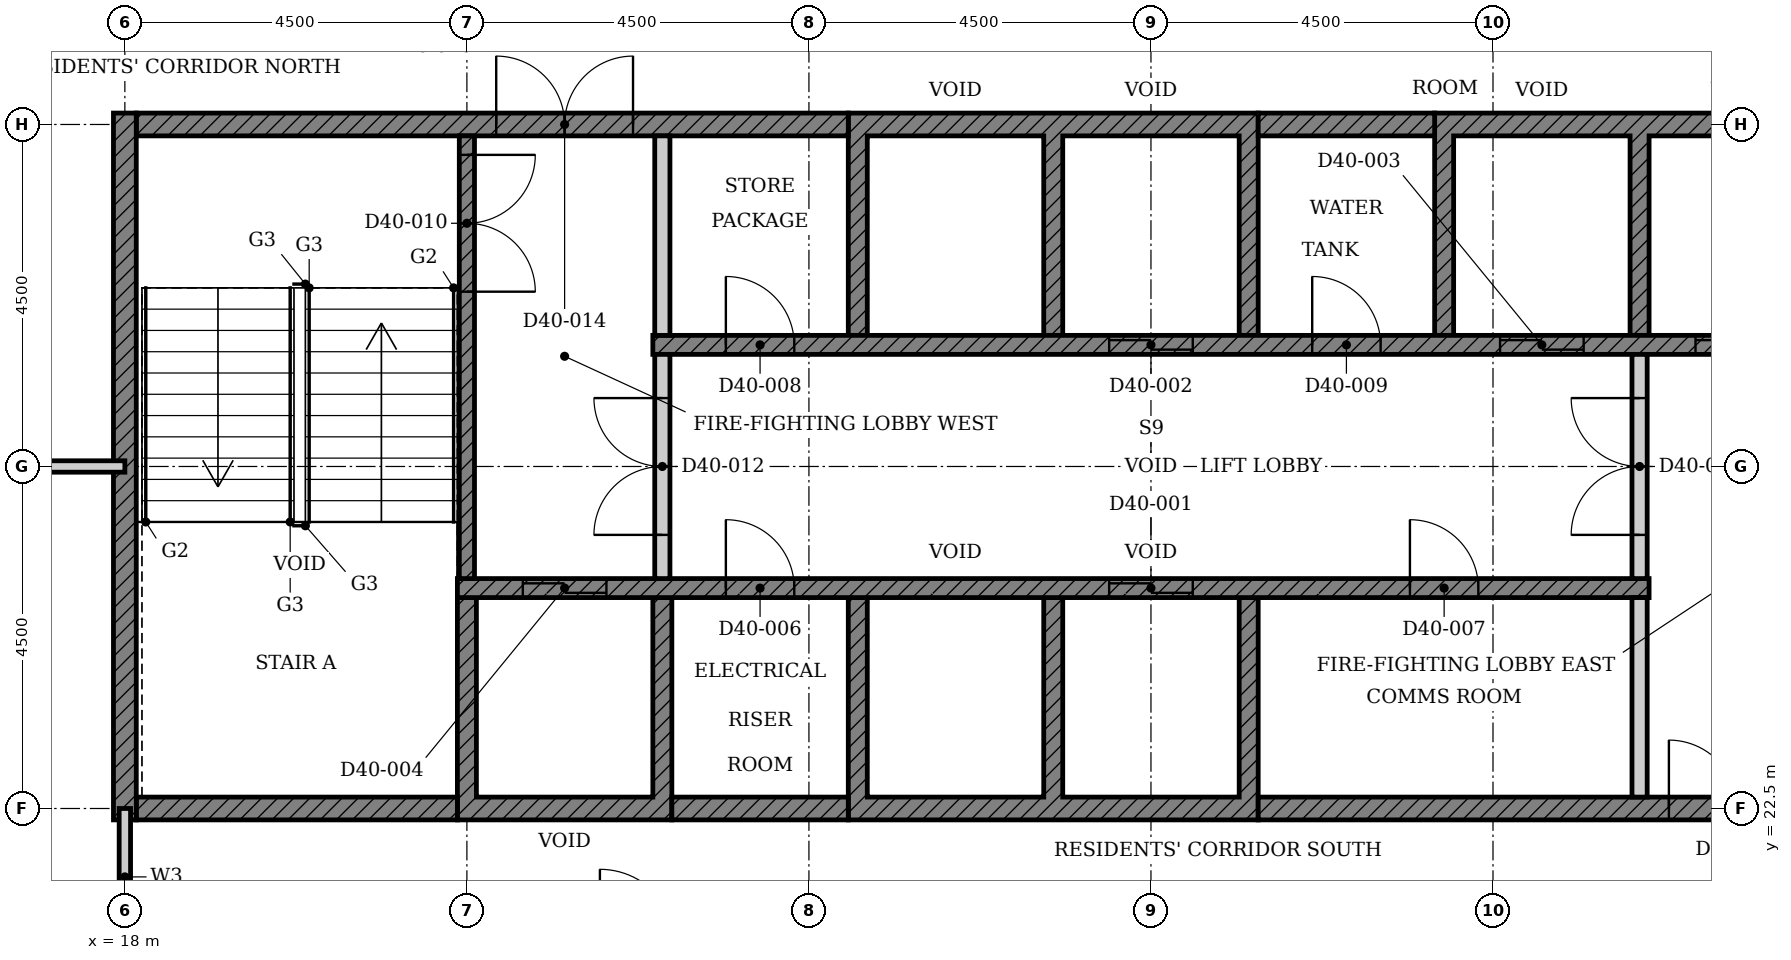
"""IFC4 building model, lengths in metres.
Left out: names, types, materials, properties, quantities, classifications, styles, units other than length and angle.
Written with IfcOpenShell. Run it as: python <this file> out.ifc"""

import sys

from ifc_helpers import new_model, si_unit, direction, frame, frame_2d, origin, place, context, subcontext, project, spatial, polyline, rectangle, outline, extrude, element, fill, save


model = new_model("IFC4")
c1 = context("Model", 3, precision=1e-05, world=origin(), true_north=direction((0.0, 1.0)))
c2 = subcontext(c1, "Body", "Model", "MODEL_VIEW")
j1 = project(units=[si_unit("LENGTHUNIT", "METRE"), si_unit("PLANEANGLEUNIT", "RADIAN")], contexts=[c1])
p1 = place(None, origin())
s1 = spatial("IfcSite", under=j1, at=p1, CompositionType="ELEMENT")
p2 = place(p1, origin())
s2 = spatial("IfcBuilding", under=s1, at=p2, CompositionType="ELEMENT")
p3 = place(p2, frame((0.0, 0.0, 161.7)))
s3 = spatial("IfcBuildingStorey", under=s2, at=p3, CompositionType="ELEMENT", Elevation=161.7)
p4 = place(p3, origin())
e1 = element("IfcWall", 1, at=p4, inside=s3, PredefinedType="SHEAR", context=c2, shape_type="SweptSolid", body=[
    extrude(outline(polyline([(22.375, 22.35), (25.197, 22.35), (25.197, 25.275), (24.947, 25.275), (24.947, 22.65), (22.625, 22.65), (22.625, 25.275), (22.375, 25.275), (22.375, 22.35)])), origin(), (0.0, 0.0, 1.0), 3.4),
])
p5 = place(p3, origin())
e2 = element("IfcWall", 2, at=p5, inside=s3, PredefinedType="SHEAR", context=c2, shape_type="SweptSolid", body=[
    extrude(outline(polyline([(27.518, 22.35), (32.911, 22.35), (32.911, 25.275), (32.661, 25.275), (32.661, 22.65), (30.339, 22.65), (30.339, 25.275), (30.089, 25.275), (30.089, 22.65), (27.768, 22.65), (27.768, 25.275), (27.518, 25.275), (27.518, 22.35)])), origin(), (0.0, 0.0, 1.0), 3.4),
])
p6 = place(p3, origin())
e3 = element("IfcWall", 3, at=p6, inside=s3, PredefinedType="SHEAR", context=c2, shape_type="SweptSolid", body=[
    extrude(outline(polyline([(27.518, 28.725), (27.768, 28.725), (27.768, 31.35), (30.089, 31.35), (30.089, 28.725), (30.339, 28.725), (30.339, 31.35), (32.661, 31.35), (32.661, 28.725), (32.911, 28.725), (32.911, 31.65), (27.518, 31.65), (27.518, 28.725)])), origin(), (0.0, 0.0, 1.0), 3.4),
])
p7 = place(p3, origin())
e4 = element("IfcWall", 4, at=p7, inside=s3, PredefinedType="SHEAR", context=c2, shape_type="SweptSolid", body=[
    extrude(outline(polyline([(35.232, 28.725), (35.482, 28.725), (35.482, 31.35), (37.803, 31.35), (37.803, 28.725), (38.053, 28.725), (38.053, 31.35), (40.375, 31.35), (40.375, 28.725), (40.625, 28.725), (40.625, 31.65), (35.232, 31.65), (35.232, 28.725)])), origin(), (0.0, 0.0, 1.0), 3.4),
])
p8 = place(p3, frame((18.15, 22.5, 0.0), z_axis=(0.0, 0.0, 1.0), x_axis=(1.0, 0.0, 0.0)))
e5 = element("IfcWall", 5, at=p8, inside=s3, PredefinedType="SHEAR", context=c2, shape_type="SweptSolid", body=[
    extrude(rectangle(XDim=4.225, YDim=0.3, at=frame_2d((2.113, 0.0))), origin(), (0.0, 0.0, 1.0), 3.4),
])
p9 = place(p3, frame((25.197, 22.5, 0.0), z_axis=(0.0, 0.0, 1.0), x_axis=(1.0, 0.0, 0.0)))
e6 = element("IfcWall", 6, at=p9, inside=s3, PredefinedType="SHEAR", context=c2, shape_type="SweptSolid", body=[
    extrude(rectangle(XDim=2.321, YDim=0.3, at=frame_2d((1.161, 0.0))), origin(), (0.0, 0.0, 1.0), 3.4),
])
p10 = place(p3, frame((32.911, 22.5, 0.0), z_axis=(0.0, 0.0, 1.0), x_axis=(1.0, 0.0, 0.0)))
e7 = element("IfcWall", 7, at=p10, inside=s3, PredefinedType="SHEAR", context=c2, shape_type="SweptSolid", body=[
    extrude(rectangle(XDim=11.939, YDim=0.3, at=frame_2d((5.97, 0.0))), origin(), (0.0, 0.0, 1.0), 3.4),
])
p11 = place(p10, frame((5.404, 0.0, 0.0)))
e8 = element("IfcOpeningElement", 8, at=p11, cuts=e7, PredefinedType="OPENING", context=c2, shape_type="SweptSolid", body=[
    extrude(rectangle(XDim=1.8, YDim=2.1, at=frame_2d((0.9, 1.05))), frame((0.0, 0.16, 0.0), z_axis=(0.0, -1.0, 0.0), x_axis=(1.0, 0.0, 0.0)), (0.0, 0.0, 1.0), 0.32),
])
p12 = place(p3, frame((18.15, 31.5, 0.0), z_axis=(0.0, 0.0, 1.0), x_axis=(1.0, 0.0, 0.0)))
e9 = element("IfcWall", 9, at=p12, inside=s3, PredefinedType="SHEAR", context=c2, shape_type="SweptSolid", body=[
    extrude(rectangle(XDim=9.368, YDim=0.3, at=frame_2d((4.684, 0.0))), origin(), (0.0, 0.0, 1.0), 3.4),
])
p13 = place(p12, frame((4.736, 0.0, 0.0)))
e10 = element("IfcOpeningElement", 10, at=p13, cuts=e9, PredefinedType="OPENING", context=c2, shape_type="SweptSolid", body=[
    extrude(rectangle(XDim=1.8, YDim=2.1, at=frame_2d((0.9, 1.05))), frame((0.0, 0.16, 0.0), z_axis=(0.0, -1.0, 0.0), x_axis=(1.0, 0.0, 0.0)), (0.0, 0.0, 1.0), 0.32),
])
p14 = place(p3, frame((32.911, 31.5, 0.0), z_axis=(0.0, 0.0, 1.0), x_axis=(1.0, 0.0, 0.0)))
e11 = element("IfcWall", 11, at=p14, inside=s3, PredefinedType="SHEAR", context=c2, shape_type="SweptSolid", body=[
    extrude(rectangle(XDim=2.322, YDim=0.3, at=frame_2d((1.161, 0.0))), origin(), (0.0, 0.0, 1.0), 3.4),
])
p15 = place(p3, frame((18.0, 22.35, 0.0), z_axis=(0.0, 0.0, 1.0), x_axis=(0.0, 1.0, 0.0)))
e12 = element("IfcWall", 12, at=p15, inside=s3, PredefinedType="SHEAR", context=c2, shape_type="SweptSolid", body=[
    extrude(rectangle(XDim=9.3, YDim=0.3, at=frame_2d((4.65, 0.0))), origin(), (0.0, 0.0, 1.0), 3.4),
])
p16 = place(p3, frame((22.375, 25.4, 0.0), z_axis=(0.0, 0.0, 1.0), x_axis=(1.0, 0.0, 0.0)))
e13 = element("IfcWall", 13, at=p16, inside=s3, PredefinedType="SHEAR", context=c2, shape_type="SweptSolid", body=[
    extrude(rectangle(XDim=15.678, YDim=0.25, at=frame_2d((7.839, 0.0))), origin(), (0.0, 0.0, 1.0), 3.4),
])
p17 = place(p16, frame((8.575, 0.0, 0.0)))
e14 = element("IfcOpeningElement", 14, at=p17, cuts=e13, PredefinedType="OPENING", context=c2, shape_type="SweptSolid", body=[
    extrude(rectangle(XDim=1.1, YDim=2.1, at=frame_2d((0.55, 1.05))), frame((0.0, 0.135, 0.0), z_axis=(0.0, -1.0, 0.0), x_axis=(1.0, 0.0, 0.0)), (0.0, 0.0, 1.0), 0.27),
])
p18 = place(p16, frame((0.861, 0.0, 0.0)))
e15 = element("IfcOpeningElement", 15, at=p18, cuts=e13, PredefinedType="OPENING", context=c2, shape_type="SweptSolid", body=[
    extrude(rectangle(XDim=1.1, YDim=2.1, at=frame_2d((0.55, 1.05))), frame((0.0, 0.135, 0.0), z_axis=(0.0, -1.0, 0.0), x_axis=(1.0, 0.0, 0.0)), (0.0, 0.0, 1.0), 0.27),
])
p19 = place(p16, frame((3.532, 0.0, 0.0)))
e16 = element("IfcOpeningElement", 16, at=p19, cuts=e13, PredefinedType="OPENING", context=c2, shape_type="SweptSolid", body=[
    extrude(rectangle(XDim=0.9, YDim=2.1, at=frame_2d((0.45, 1.05))), frame((0.0, 0.135, 0.0), z_axis=(0.0, -1.0, 0.0), x_axis=(1.0, 0.0, 0.0)), (0.0, 0.0, 1.0), 0.27),
])
p20 = place(p16, frame((12.532, 0.0, 0.0)))
e17 = element("IfcOpeningElement", 17, at=p20, cuts=e13, PredefinedType="OPENING", context=c2, shape_type="SweptSolid", body=[
    extrude(rectangle(XDim=0.9, YDim=2.1, at=frame_2d((0.45, 1.05))), frame((0.0, 0.135, 0.0), z_axis=(0.0, -1.0, 0.0), x_axis=(1.0, 0.0, 0.0)), (0.0, 0.0, 1.0), 0.27),
])
p21 = place(p3, frame((24.947, 28.6, 0.0), z_axis=(0.0, 0.0, 1.0), x_axis=(1.0, 0.0, 0.0)))
e18 = element("IfcWall", 18, at=p21, inside=s3, PredefinedType="SHEAR", context=c2, shape_type="SweptSolid", body=[
    extrude(rectangle(XDim=15.678, YDim=0.25, at=frame_2d((7.839, 0.0))), origin(), (0.0, 0.0, 1.0), 3.4),
])
p22 = place(p21, frame((6.004, 0.0, 0.0)))
e19 = element("IfcOpeningElement", 19, at=p22, cuts=e18, PredefinedType="OPENING", context=c2, shape_type="SweptSolid", body=[
    extrude(rectangle(XDim=1.1, YDim=2.1, at=frame_2d((0.55, 1.05))), frame((0.0, 0.135, 0.0), z_axis=(0.0, -1.0, 0.0), x_axis=(1.0, 0.0, 0.0)), (0.0, 0.0, 1.0), 0.27),
])
p23 = place(p21, frame((11.146, 0.0, 0.0)))
e20 = element("IfcOpeningElement", 20, at=p23, cuts=e18, PredefinedType="OPENING", context=c2, shape_type="SweptSolid", body=[
    extrude(rectangle(XDim=1.1, YDim=2.1, at=frame_2d((0.55, 1.05))), frame((0.0, 0.135, 0.0), z_axis=(0.0, -1.0, 0.0), x_axis=(1.0, 0.0, 0.0)), (0.0, 0.0, 1.0), 0.27),
])
p24 = place(p21, frame((13.718, 0.0, 0.0)))
e21 = element("IfcOpeningElement", 21, at=p24, cuts=e18, PredefinedType="OPENING", context=c2, shape_type="SweptSolid", body=[
    extrude(rectangle(XDim=1.1, YDim=2.1, at=frame_2d((0.55, 1.05))), frame((0.0, 0.135, 0.0), z_axis=(0.0, -1.0, 0.0), x_axis=(1.0, 0.0, 0.0)), (0.0, 0.0, 1.0), 0.27),
])
p25 = place(p21, frame((0.961, 0.0, 0.0)))
e22 = element("IfcOpeningElement", 22, at=p25, cuts=e18, PredefinedType="OPENING", context=c2, shape_type="SweptSolid", body=[
    extrude(rectangle(XDim=0.9, YDim=2.1, at=frame_2d((0.45, 1.05))), frame((0.0, 0.135, 0.0), z_axis=(0.0, -1.0, 0.0), x_axis=(1.0, 0.0, 0.0)), (0.0, 0.0, 1.0), 0.27),
])
p26 = place(p21, frame((8.675, 0.0, 0.0)))
e23 = element("IfcOpeningElement", 23, at=p26, cuts=e18, PredefinedType="OPENING", context=c2, shape_type="SweptSolid", body=[
    extrude(rectangle(XDim=0.9, YDim=2.1, at=frame_2d((0.45, 1.05))), frame((0.0, 0.135, 0.0), z_axis=(0.0, -1.0, 0.0), x_axis=(1.0, 0.0, 0.0)), (0.0, 0.0, 1.0), 0.27),
])
for number, where, z_axis, x_axis in (
    (24, (37.928, 22.65, 0.0), (0.0, 0.0, 1.0), (0.0, 1.0, 0.0)),
    (25, (25.072, 28.725, 0.0), (0.0, 0.0, 1.0), (0.0, 1.0, 0.0)),
):
    element("IfcWall", number, at=place(p3, frame(where, z_axis=z_axis, x_axis=x_axis)), inside=s3, PredefinedType="PARTITIONING", context=c2, shape_type="SweptSolid", body=[
        extrude(rectangle(XDim=2.625, YDim=0.2, at=frame_2d((1.312, 0.0))), origin(), (0.0, 0.0, 1.0), 3.4),
    ])
p27 = place(p3, frame((22.5, 31.35, 0.0), z_axis=(0.0, 0.0, 1.0), x_axis=(0.0, -1.0, 0.0)))
e26 = element("IfcWall", 26, at=p27, inside=s3, PredefinedType="SHEAR", context=c2, shape_type="SweptSolid", body=[
    extrude(rectangle(XDim=5.825, YDim=0.2, at=frame_2d((2.913, 0.0))), origin(), (0.0, 0.0, 1.0), 3.4),
])
p28 = place(p27, frame((0.25, 0.0, 0.0)))
e27 = element("IfcOpeningElement", 27, at=p28, cuts=e26, PredefinedType="OPENING", context=c2, shape_type="SweptSolid", body=[
    extrude(rectangle(XDim=1.8, YDim=2.1, at=frame_2d((0.9, 1.05))), frame((0.0, 0.11, 0.0), z_axis=(0.0, -1.0, 0.0), x_axis=(1.0, 0.0, 0.0)), (0.0, 0.0, 1.0), 0.22),
])
p29 = place(p3, frame((25.072, 25.525, 0.0), z_axis=(0.0, 0.0, 1.0), x_axis=(0.0, 1.0, 0.0)))
e28 = element("IfcWall", 28, at=p29, inside=s3, PredefinedType="PARTITIONING", context=c2, shape_type="SweptSolid", body=[
    extrude(rectangle(XDim=2.95, YDim=0.2, at=frame_2d((1.475, 0.0))), origin(), (0.0, 0.0, 1.0), 3.4),
])
p30 = place(p29, frame((0.575, 0.0, 0.0)))
e29 = element("IfcOpeningElement", 29, at=p30, cuts=e28, PredefinedType="OPENING", context=c2, shape_type="SweptSolid", body=[
    extrude(rectangle(XDim=1.8, YDim=2.1, at=frame_2d((0.9, 1.05))), frame((0.0, 0.11, 0.0), z_axis=(0.0, -1.0, 0.0), x_axis=(1.0, 0.0, 0.0)), (0.0, 0.0, 1.0), 0.22),
])
p31 = place(p3, frame((37.928, 25.525, 0.0), z_axis=(0.0, 0.0, 1.0), x_axis=(0.0, 1.0, 0.0)))
e30 = element("IfcWall", 30, at=p31, inside=s3, PredefinedType="PARTITIONING", context=c2, shape_type="SweptSolid", body=[
    extrude(rectangle(XDim=2.95, YDim=0.2, at=frame_2d((1.475, 0.0))), origin(), (0.0, 0.0, 1.0), 3.4),
])
p32 = place(p31, frame((0.575, 0.0, 0.0)))
e31 = element("IfcOpeningElement", 31, at=p32, cuts=e30, PredefinedType="OPENING", context=c2, shape_type="SweptSolid", body=[
    extrude(rectangle(XDim=1.8, YDim=2.1, at=frame_2d((0.9, 1.05))), frame((0.0, 0.11, 0.0), z_axis=(0.0, -1.0, 0.0), x_axis=(1.0, 0.0, 0.0)), (0.0, 0.0, 1.0), 0.22),
])
p33 = place(p3, frame((4.5, 27.0, 0.0), z_axis=(0.0, 0.0, 1.0), x_axis=(1.0, 0.0, 0.0)))
e32 = element("IfcWall", 32, at=p33, inside=s3, PredefinedType="PARTITIONING", context=c2, shape_type="SweptSolid", body=[
    extrude(rectangle(XDim=13.5, YDim=0.15, at=frame_2d((6.75, 0.0))), origin(), (0.0, 0.0, 1.0), 2.68),
])
p34 = place(p33, frame((5.35, 0.0, 0.0)))
e33 = element("IfcOpeningElement", 33, at=p34, cuts=e32, PredefinedType="OPENING", context=c2, shape_type="SweptSolid", body=[
    extrude(rectangle(XDim=1.0, YDim=2.1, at=frame_2d((0.5, 1.05))), frame((0.0, 0.085, 0.0), z_axis=(0.0, -1.0, 0.0), x_axis=(1.0, 0.0, 0.0)), (0.0, 0.0, 1.0), 0.17),
])
p35 = place(p3, frame((18.0, 20.7, 0.0), z_axis=(0.0, 0.0, 1.0), x_axis=(0.0, 1.0, 0.0)))
e34 = element("IfcWall", 34, at=p35, inside=s3, PredefinedType="PARTITIONING", context=c2, shape_type="SweptSolid", body=[
    extrude(rectangle(XDim=1.8, YDim=0.15, at=frame_2d((0.9, 0.0))), origin(), (0.0, 0.0, 1.0), 3.4),
])
p36 = place(p17, origin())
e35 = element("IfcDoor", 35, at=p36, inside=s3, OperationType="DOUBLE_DOOR_SLIDING", PredefinedType="DOOR", context=c2, shape_type="SweptSolid", body=[
    extrude(rectangle(XDim=1.1, YDim=2.1, at=frame_2d((0.55, 1.05))), frame((0.0, 0.025, 0.0), z_axis=(0.0, -1.0, 0.0), x_axis=(1.0, 0.0, 0.0)), (0.0, 0.0, 1.0), 0.05),
])
fill(e14, e35)
p37 = place(p22, origin())
e36 = element("IfcDoor", 36, at=p37, inside=s3, OperationType="DOUBLE_DOOR_SLIDING", PredefinedType="DOOR", context=c2, shape_type="SweptSolid", body=[
    extrude(rectangle(XDim=1.1, YDim=2.1, at=frame_2d((0.55, 1.05))), frame((0.0, 0.025, 0.0), z_axis=(0.0, -1.0, 0.0), x_axis=(1.0, 0.0, 0.0)), (0.0, 0.0, 1.0), 0.05),
])
fill(e19, e36)
p38 = place(p23, origin())
e37 = element("IfcDoor", 37, at=p38, inside=s3, OperationType="DOUBLE_DOOR_SLIDING", PredefinedType="DOOR", context=c2, shape_type="SweptSolid", body=[
    extrude(rectangle(XDim=1.1, YDim=2.1, at=frame_2d((0.55, 1.05))), frame((0.0, 0.025, 0.0), z_axis=(0.0, -1.0, 0.0), x_axis=(1.0, 0.0, 0.0)), (0.0, 0.0, 1.0), 0.05),
])
fill(e20, e37)
p39 = place(p18, origin())
e38 = element("IfcDoor", 38, at=p39, inside=s3, OperationType="DOUBLE_DOOR_SLIDING", PredefinedType="DOOR", context=c2, shape_type="SweptSolid", body=[
    extrude(rectangle(XDim=1.1, YDim=2.1, at=frame_2d((0.55, 1.05))), frame((0.0, 0.025, 0.0), z_axis=(0.0, -1.0, 0.0), x_axis=(1.0, 0.0, 0.0)), (0.0, 0.0, 1.0), 0.05),
])
fill(e15, e38)
p40 = place(p24, origin())
e39 = element("IfcDoor", 39, at=p40, inside=s3, OperationType="DOUBLE_DOOR_SLIDING", PredefinedType="DOOR", context=c2, shape_type="SweptSolid", body=[
    extrude(rectangle(XDim=1.1, YDim=2.1, at=frame_2d((0.55, 1.05))), frame((0.0, 0.025, 0.0), z_axis=(0.0, -1.0, 0.0), x_axis=(1.0, 0.0, 0.0)), (0.0, 0.0, 1.0), 0.05),
])
fill(e21, e39)
p41 = place(p19, origin())
e40 = element("IfcDoor", 40, at=p41, inside=s3, OperationType="SINGLE_SWING_LEFT", PredefinedType="DOOR", context=c2, shape_type="SweptSolid", body=[
    extrude(rectangle(XDim=0.9, YDim=2.1, at=frame_2d((0.45, 1.05))), frame((0.0, 0.025, 0.0), z_axis=(0.0, -1.0, 0.0), x_axis=(1.0, 0.0, 0.0)), (0.0, 0.0, 1.0), 0.05),
])
fill(e16, e40)
p42 = place(p20, origin())
e41 = element("IfcDoor", 41, at=p42, inside=s3, OperationType="SINGLE_SWING_LEFT", PredefinedType="DOOR", context=c2, shape_type="SweptSolid", body=[
    extrude(rectangle(XDim=0.9, YDim=2.1, at=frame_2d((0.45, 1.05))), frame((0.0, 0.025, 0.0), z_axis=(0.0, -1.0, 0.0), x_axis=(1.0, 0.0, 0.0)), (0.0, 0.0, 1.0), 0.05),
])
fill(e17, e41)
p43 = place(p25, origin())
e42 = element("IfcDoor", 42, at=p43, inside=s3, OperationType="SINGLE_SWING_LEFT", PredefinedType="DOOR", context=c2, shape_type="SweptSolid", body=[
    extrude(rectangle(XDim=0.9, YDim=2.1, at=frame_2d((0.45, 1.05))), frame((0.0, 0.025, 0.0), z_axis=(0.0, -1.0, 0.0), x_axis=(1.0, 0.0, 0.0)), (0.0, 0.0, 1.0), 0.05),
])
fill(e22, e42)
p44 = place(p26, origin())
e43 = element("IfcDoor", 43, at=p44, inside=s3, OperationType="SINGLE_SWING_LEFT", PredefinedType="DOOR", context=c2, shape_type="SweptSolid", body=[
    extrude(rectangle(XDim=0.9, YDim=2.1, at=frame_2d((0.45, 1.05))), frame((0.0, 0.025, 0.0), z_axis=(0.0, -1.0, 0.0), x_axis=(1.0, 0.0, 0.0)), (0.0, 0.0, 1.0), 0.05),
])
fill(e23, e43)
p45 = place(p28, origin())
e44 = element("IfcDoor", 44, at=p45, inside=s3, OperationType="DOUBLE_DOOR_SINGLE_SWING", PredefinedType="DOOR", context=c2, shape_type="SweptSolid", body=[
    extrude(rectangle(XDim=1.8, YDim=2.1, at=frame_2d((0.9, 1.05))), frame((0.0, 0.025, 0.0), z_axis=(0.0, -1.0, 0.0), x_axis=(1.0, 0.0, 0.0)), (0.0, 0.0, 1.0), 0.05),
])
fill(e27, e44)
p46 = place(p30, origin())
e45 = element("IfcDoor", 45, at=p46, inside=s3, OperationType="DOUBLE_DOOR_SINGLE_SWING", PredefinedType="DOOR", context=c2, shape_type="SweptSolid", body=[
    extrude(rectangle(XDim=1.8, YDim=2.1, at=frame_2d((0.9, 1.05))), frame((0.0, 0.025, 0.0), z_axis=(0.0, -1.0, 0.0), x_axis=(1.0, 0.0, 0.0)), (0.0, 0.0, 1.0), 0.05),
])
fill(e29, e45)
p47 = place(p32, origin())
e46 = element("IfcDoor", 46, at=p47, inside=s3, OperationType="DOUBLE_DOOR_SINGLE_SWING", PredefinedType="DOOR", context=c2, shape_type="SweptSolid", body=[
    extrude(rectangle(XDim=1.8, YDim=2.1, at=frame_2d((0.9, 1.05))), frame((0.0, 0.025, 0.0), z_axis=(0.0, -1.0, 0.0), x_axis=(1.0, 0.0, 0.0)), (0.0, 0.0, 1.0), 0.05),
])
fill(e31, e46)
p48 = place(p13, origin())
e47 = element("IfcDoor", 47, at=p48, inside=s3, OperationType="DOUBLE_DOOR_SINGLE_SWING", PredefinedType="DOOR", context=c2, shape_type="SweptSolid", body=[
    extrude(rectangle(XDim=1.8, YDim=2.1, at=frame_2d((0.9, 1.05))), frame((0.0, 0.025, 0.0), z_axis=(0.0, -1.0, 0.0), x_axis=(1.0, 0.0, 0.0)), (0.0, 0.0, 1.0), 0.05),
])
fill(e10, e47)
p49 = place(p11, origin())
e48 = element("IfcDoor", 48, at=p49, inside=s3, OperationType="DOUBLE_DOOR_SINGLE_SWING", PredefinedType="DOOR", context=c2, shape_type="SweptSolid", body=[
    extrude(rectangle(XDim=1.8, YDim=2.1, at=frame_2d((0.9, 1.05))), frame((0.0, 0.025, 0.0), z_axis=(0.0, -1.0, 0.0), x_axis=(1.0, 0.0, 0.0)), (0.0, 0.0, 1.0), 0.05),
])
fill(e8, e48)
save(model, sys.argv[1])
